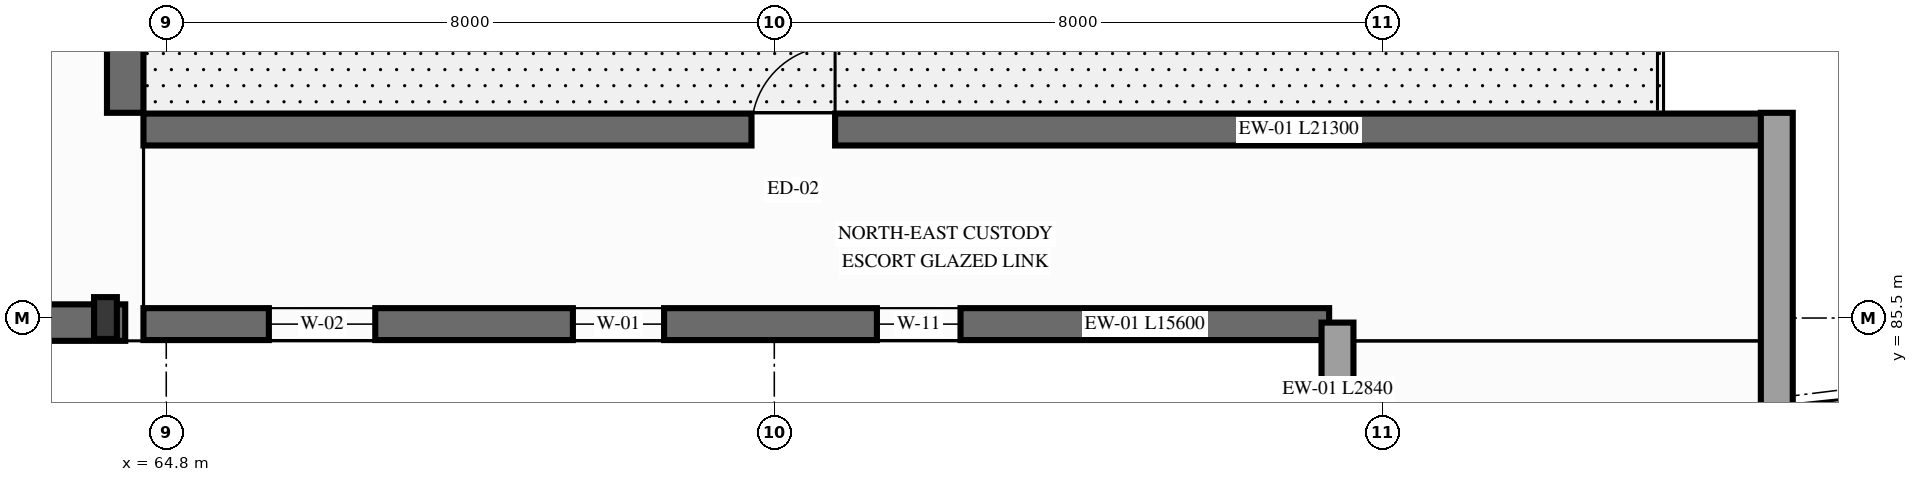
"""IFC4 building model, lengths in metres.
Left out: names, types, materials, properties, quantities, classifications, styles, units other than length and angle.
Written with IfcOpenShell. Run it as: python <this file> out.ifc"""

import sys

from ifc_helpers import new_model, si_unit, direction, frame, frame_2d, origin, origin_2d, place, context, subcontext, project, spatial, rectangle, i_section, extrude, element, fill, save


model = new_model("IFC4")
c1 = context("Model", 3, precision=1e-05, world=origin(), true_north=direction((0.0, 1.0)))
c2 = subcontext(c1, "Body", "Model", "MODEL_VIEW")
j1 = project(units=[si_unit("LENGTHUNIT", "METRE"), si_unit("PLANEANGLEUNIT", "RADIAN")], contexts=[c1])
p1 = place(None, origin())
s1 = spatial("IfcSite", under=j1, at=p1, CompositionType="ELEMENT")
p2 = place(p1, origin())
s2 = spatial("IfcBuilding", under=s1, at=p2, CompositionType="ELEMENT")
p3 = place(p2, frame((0.0, 0.0, 9.3)))
s3 = spatial("IfcBuildingStorey", under=s2, at=p3, CompositionType="ELEMENT", Elevation=9.3)
p4 = place(p3, frame((64.0, 85.5, 0.0), z_axis=(0.0, 0.0, 1.0), x_axis=(1.0, 0.0, 0.0)))
e1 = element("IfcColumn", 1, at=p4, inside=s3, PredefinedType="COLUMN", context=c2, shape_type="SweptSolid", body=[
    extrude(i_section(OverallWidth=0.3, OverallDepth=0.55, WebThickness=0.015, FlangeThickness=0.029, FilletRadius=0.027, at=origin_2d()), origin(), (0.0, 0.0, 1.0), 3.94),
])
p5 = place(p3, frame((28.5, 85.44, 0.0), z_axis=(0.0, 0.0, 1.0), x_axis=(1.0, 0.0, 0.0)))
e2 = element("IfcWall", 2, at=p5, inside=s3, PredefinedType="SOLIDWALL", context=c2, shape_type="SweptSolid", body=[
    extrude(rectangle(XDim=35.76, YDim=0.48, at=frame_2d((17.88, 0.0))), origin(), (0.0, 0.0, 1.0), 4.12),
])
p6 = place(p5, frame((1.65, 0.0, 0.95)))
e3 = element("IfcOpeningElement", 3, at=p6, cuts=e2, PredefinedType="OPENING", context=c2, shape_type="SweptSolid", body=[
    extrude(rectangle(XDim=1.4, YDim=2.2, at=frame_2d((0.7, 1.1))), frame((0.0, 0.25, 0.0), z_axis=(0.0, -1.0, 0.0), x_axis=(1.0, 0.0, 0.0)), (0.0, 0.0, 1.0), 0.5),
])
p7 = place(p5, frame((5.85, 0.0, 0.95)))
e4 = element("IfcOpeningElement", 4, at=p7, cuts=e2, PredefinedType="OPENING", context=c2, shape_type="SweptSolid", body=[
    extrude(rectangle(XDim=1.2, YDim=2.1, at=frame_2d((0.6, 1.05))), frame((0.0, 0.25, 0.0), z_axis=(0.0, -1.0, 0.0), x_axis=(1.0, 0.0, 0.0)), (0.0, 0.0, 1.0), 0.5),
])
p8 = place(p5, frame((14.25, 0.0, 0.95)))
e5 = element("IfcOpeningElement", 5, at=p8, cuts=e2, PredefinedType="OPENING", context=c2, shape_type="SweptSolid", body=[
    extrude(rectangle(XDim=1.0, YDim=1.6, at=frame_2d((0.5, 0.8))), frame((0.0, 0.25, 0.0), z_axis=(0.0, -1.0, 0.0), x_axis=(1.0, 0.0, 0.0)), (0.0, 0.0, 1.0), 0.5),
])
p9 = place(p5, frame((22.65, 0.0, 0.95)))
e6 = element("IfcOpeningElement", 6, at=p9, cuts=e2, PredefinedType="OPENING", context=c2, shape_type="SweptSolid", body=[
    extrude(rectangle(XDim=1.2, YDim=2.1, at=frame_2d((0.6, 1.05))), frame((0.0, 0.25, 0.0), z_axis=(0.0, -1.0, 0.0), x_axis=(1.0, 0.0, 0.0)), (0.0, 0.0, 1.0), 0.5),
])
p10 = place(p5, frame((31.05, 0.0, 0.95)))
e7 = element("IfcOpeningElement", 7, at=p10, cuts=e2, PredefinedType="OPENING", context=c2, shape_type="SweptSolid", body=[
    extrude(rectangle(XDim=1.0, YDim=1.6, at=frame_2d((0.5, 0.8))), frame((0.0, 0.25, 0.0), z_axis=(0.0, -1.0, 0.0), x_axis=(1.0, 0.0, 0.0)), (0.0, 0.0, 1.0), 0.5),
])
p11 = place(p3, frame((64.26, 88.2, 0.0), z_axis=(0.0, 0.0, 1.0), x_axis=(0.0, 1.0, 0.0)))
e8 = element("IfcWall", 8, at=p11, inside=s3, PredefinedType="SOLIDWALL", context=c2, shape_type="SweptSolid", body=[
    extrude(rectangle(XDim=28.51, YDim=0.48, at=frame_2d((14.255, 0.0))), origin(), (0.0, 0.0, 1.0), 4.12),
])
p12 = place(p11, frame((11.1, 0.0, 0.0), z_axis=(0.0, 0.0, 1.0), x_axis=(-1.0, 0.0, 0.0)))
e9 = element("IfcOpeningElement", 9, at=p12, cuts=e8, PredefinedType="OPENING", context=c2, shape_type="SweptSolid", body=[
    extrude(rectangle(XDim=1.1, YDim=2.25, at=frame_2d((0.55, 1.125))), frame((0.0, 0.25, 0.0), z_axis=(0.0, -1.0, 0.0), x_axis=(1.0, 0.0, 0.0)), (0.0, 0.0, 1.0), 0.5),
])
p13 = place(p11, frame((1.65, 0.0, 0.95)))
e10 = element("IfcOpeningElement", 10, at=p13, cuts=e8, PredefinedType="OPENING", context=c2, shape_type="SweptSolid", body=[
    extrude(rectangle(XDim=1.4, YDim=2.2, at=frame_2d((0.7, 1.1))), frame((0.0, 0.25, 0.0), z_axis=(0.0, -1.0, 0.0), x_axis=(1.0, 0.0, 0.0)), (0.0, 0.0, 1.0), 0.5),
])
p14 = place(p11, frame((5.85, 0.0, 0.95)))
e11 = element("IfcOpeningElement", 11, at=p14, cuts=e8, PredefinedType="OPENING", context=c2, shape_type="SweptSolid", body=[
    extrude(rectangle(XDim=1.2, YDim=2.1, at=frame_2d((0.6, 1.05))), frame((0.0, 0.25, 0.0), z_axis=(0.0, -1.0, 0.0), x_axis=(1.0, 0.0, 0.0)), (0.0, 0.0, 1.0), 0.5),
])
p15 = place(p11, frame((14.25, 0.0, 0.95)))
e12 = element("IfcOpeningElement", 12, at=p15, cuts=e8, PredefinedType="OPENING", context=c2, shape_type="SweptSolid", body=[
    extrude(rectangle(XDim=1.0, YDim=1.6, at=frame_2d((0.5, 0.8))), frame((0.0, 0.25, 0.0), z_axis=(0.0, -1.0, 0.0), x_axis=(1.0, 0.0, 0.0)), (0.0, 0.0, 1.0), 0.5),
])
p16 = place(p11, frame((18.45, 0.0, 0.95)))
e13 = element("IfcOpeningElement", 13, at=p16, cuts=e8, PredefinedType="OPENING", context=c2, shape_type="SweptSolid", body=[
    extrude(rectangle(XDim=1.4, YDim=2.2, at=frame_2d((0.7, 1.1))), frame((0.0, 0.25, 0.0), z_axis=(0.0, -1.0, 0.0), x_axis=(1.0, 0.0, 0.0)), (0.0, 0.0, 1.0), 0.5),
])
p17 = place(p11, frame((22.65, 0.0, 0.95)))
e14 = element("IfcOpeningElement", 14, at=p17, cuts=e8, PredefinedType="OPENING", context=c2, shape_type="SweptSolid", body=[
    extrude(rectangle(XDim=1.2, YDim=2.1, at=frame_2d((0.6, 1.05))), frame((0.0, 0.25, 0.0), z_axis=(0.0, -1.0, 0.0), x_axis=(1.0, 0.0, 0.0)), (0.0, 0.0, 1.0), 0.5),
])
p18 = place(p3, frame((64.5, 85.42, 0.0), z_axis=(0.0, 0.0, 1.0), x_axis=(1.0, 0.0, 0.0)))
e15 = element("IfcWall", 15, at=p18, inside=s3, PredefinedType="SOLIDWALL", context=c2, shape_type="SweptSolid", body=[
    extrude(rectangle(XDim=15.6, YDim=0.42, at=frame_2d((7.8, 0.0))), origin(), (0.0, 0.0, 1.0), 3.86),
])
p19 = place(p18, frame((1.65, 0.0, 0.95)))
e16 = element("IfcOpeningElement", 16, at=p19, cuts=e15, PredefinedType="OPENING", context=c2, shape_type="SweptSolid", body=[
    extrude(rectangle(XDim=1.4, YDim=2.2, at=frame_2d((0.7, 1.1))), frame((0.0, 0.22, 0.0), z_axis=(0.0, -1.0, 0.0), x_axis=(1.0, 0.0, 0.0)), (0.0, 0.0, 1.0), 0.44),
])
p20 = place(p18, frame((5.65, 0.0, 0.95)))
e17 = element("IfcOpeningElement", 17, at=p20, cuts=e15, PredefinedType="OPENING", context=c2, shape_type="SweptSolid", body=[
    extrude(rectangle(XDim=1.2, YDim=2.1, at=frame_2d((0.6, 1.05))), frame((0.0, 0.22, 0.0), z_axis=(0.0, -1.0, 0.0), x_axis=(1.0, 0.0, 0.0)), (0.0, 0.0, 1.0), 0.44),
])
p21 = place(p18, frame((9.65, 0.0, 0.95)))
e18 = element("IfcOpeningElement", 18, at=p21, cuts=e15, PredefinedType="OPENING", context=c2, shape_type="SweptSolid", body=[
    extrude(rectangle(XDim=1.1, YDim=1.5, at=frame_2d((0.55, 0.75))), frame((0.0, 0.22, 0.0), z_axis=(0.0, -1.0, 0.0), x_axis=(1.0, 0.0, 0.0)), (0.0, 0.0, 1.0), 0.44),
])
p22 = place(p3, frame((64.5, 87.98, 0.0), z_axis=(0.0, 0.0, 1.0), x_axis=(1.0, 0.0, 0.0)))
e19 = element("IfcWall", 19, at=p22, inside=s3, PredefinedType="SOLIDWALL", context=c2, shape_type="SweptSolid", body=[
    extrude(rectangle(XDim=21.3, YDim=0.42, at=frame_2d((10.65, 0.0))), origin(), (0.0, 0.0, 1.0), 3.86),
])
p23 = place(p22, frame((8.0, 0.0, 0.0)))
e20 = element("IfcOpeningElement", 20, at=p23, cuts=e19, PredefinedType="OPENING", context=c2, shape_type="SweptSolid", body=[
    extrude(rectangle(XDim=1.1, YDim=2.25, at=frame_2d((0.55, 1.125))), frame((0.0, 0.22, 0.0), z_axis=(0.0, -1.0, 0.0), x_axis=(1.0, 0.0, 0.0)), (0.0, 0.0, 1.0), 0.44),
])
p24 = place(p3, frame((80.21, 82.6, 0.0), z_axis=(0.0, 0.0, 1.0), x_axis=(0.0, 1.0, 0.0)))
e21 = element("IfcWall", 21, at=p24, inside=s3, PredefinedType="SOLIDWALL", context=c2, shape_type="SweptSolid", body=[
    extrude(rectangle(XDim=2.84, YDim=0.42, at=frame_2d((1.42, 0.0))), origin(), (0.0, 0.0, 1.0), 3.678),
])
p25 = place(p3, frame((85.99, 82.0, 0.0), z_axis=(0.0, 0.0, 1.0), x_axis=(0.0, 1.0, 0.0)))
e22 = element("IfcWall", 22, at=p25, inside=s3, PredefinedType="SOLIDWALL", context=c2, shape_type="SweptSolid", body=[
    extrude(rectangle(XDim=6.2, YDim=0.42, at=frame_2d((3.1, 0.0))), origin(), (0.0, 0.0, 1.0), 3.678),
])
p26 = place(p25, frame((0.75, 0.0, 0.0)))
e23 = element("IfcOpeningElement", 23, at=p26, cuts=e22, PredefinedType="OPENING", context=c2, shape_type="SweptSolid", body=[
    extrude(rectangle(XDim=0.92, YDim=2.12, at=frame_2d((0.46, 1.06))), frame((0.0, 0.22, 0.0), z_axis=(0.0, -1.0, 0.0), x_axis=(1.0, 0.0, 0.0)), (0.0, 0.0, 1.0), 0.44),
])
p27 = place(p23, origin())
e24 = element("IfcDoor", 24, at=p27, inside=s3, OperationType="SINGLE_SWING_RIGHT", PredefinedType="DOOR", context=c2, shape_type="SweptSolid", body=[
    extrude(rectangle(XDim=1.1, YDim=2.25, at=frame_2d((0.55, 1.125))), frame((0.0, 0.025, 0.0), z_axis=(0.0, -1.0, 0.0), x_axis=(1.0, 0.0, 0.0)), (0.0, 0.0, 1.0), 0.05),
])
fill(e20, e24)
p28 = place(p19, origin())
e25 = element("IfcWindow", 25, at=p28, inside=s3, PartitioningType="SINGLE_PANEL", PredefinedType="WINDOW", context=c2, shape_type="SweptSolid", body=[
    extrude(rectangle(XDim=1.4, YDim=2.2, at=frame_2d((0.7, 1.1))), frame((0.0, 0.03, 0.0), z_axis=(0.0, -1.0, 0.0), x_axis=(1.0, 0.0, 0.0)), (0.0, 0.0, 1.0), 0.06),
])
fill(e16, e25)
p29 = place(p20, origin())
e26 = element("IfcWindow", 26, at=p29, inside=s3, PartitioningType="SINGLE_PANEL", PredefinedType="WINDOW", context=c2, shape_type="SweptSolid", body=[
    extrude(rectangle(XDim=1.2, YDim=2.1, at=frame_2d((0.6, 1.05))), frame((0.0, 0.03, 0.0), z_axis=(0.0, -1.0, 0.0), x_axis=(1.0, 0.0, 0.0)), (0.0, 0.0, 1.0), 0.06),
])
fill(e17, e26)
p30 = place(p21, origin())
e27 = element("IfcWindow", 27, at=p30, inside=s3, PartitioningType="SINGLE_PANEL", PredefinedType="WINDOW", context=c2, shape_type="SweptSolid", body=[
    extrude(rectangle(XDim=1.1, YDim=1.5, at=frame_2d((0.55, 0.75))), frame((0.0, 0.03, 0.0), z_axis=(0.0, -1.0, 0.0), x_axis=(1.0, 0.0, 0.0)), (0.0, 0.0, 1.0), 0.06),
])
fill(e18, e27)
save(model, sys.argv[1])
